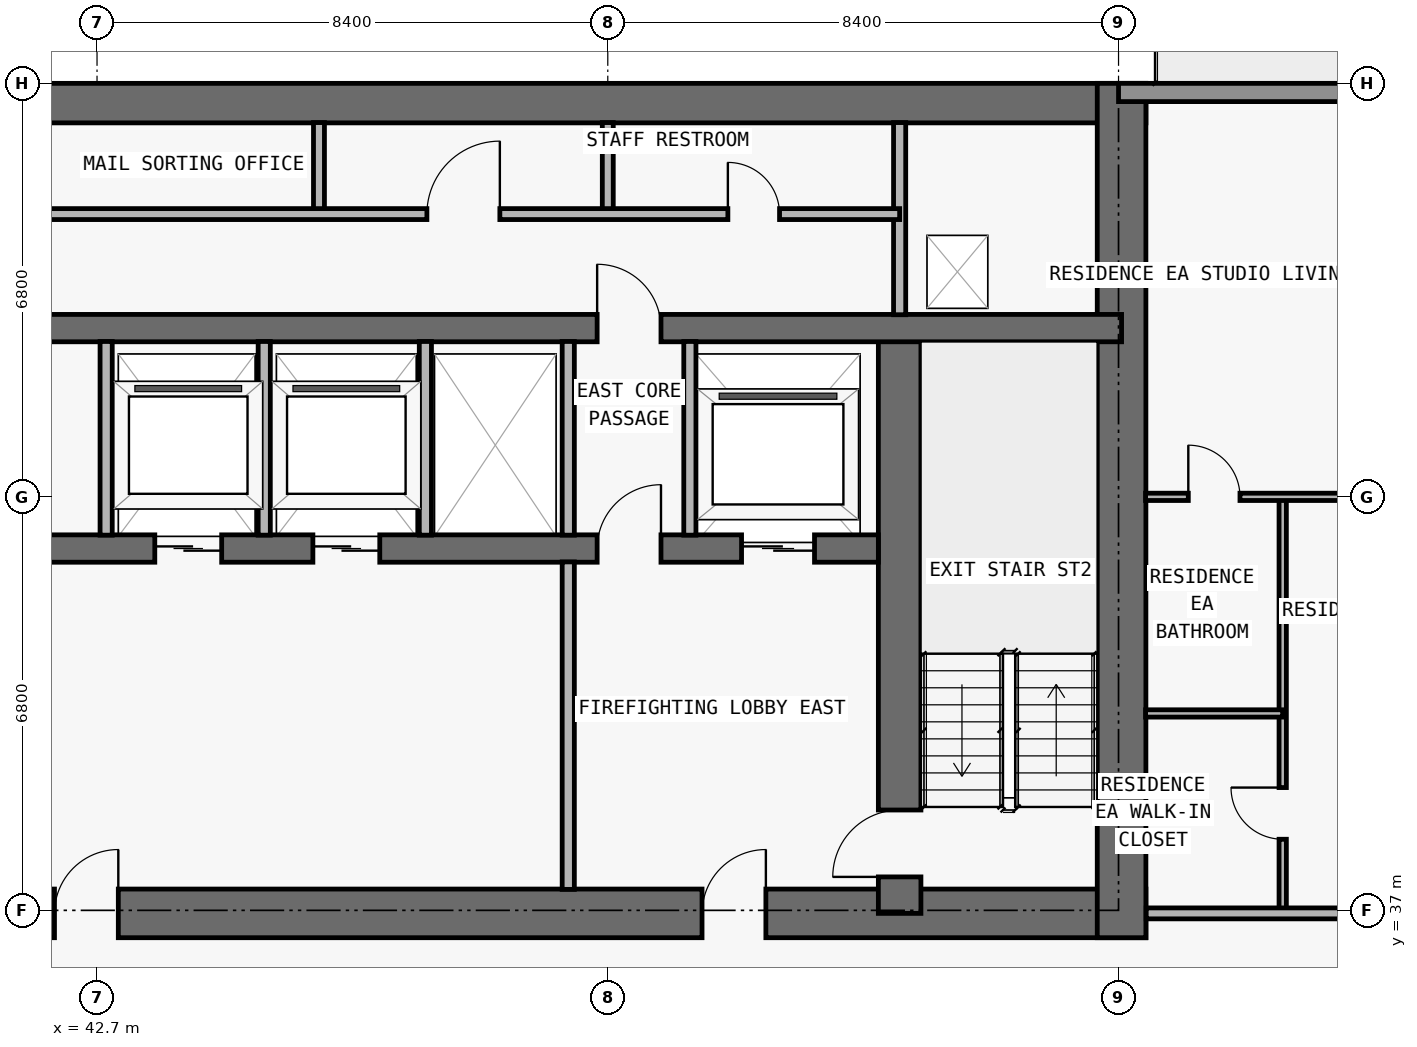
"""IFC4 building model, lengths in metres.
Left out: names, types, materials, properties, quantities, classifications, styles, units other than length and angle.
Written with IfcOpenShell. Run it as: python <this file> out.ifc"""

import sys

from ifc_helpers import new_model, si_unit, direction, frame, frame_2d, origin, place, context, subcontext, project, spatial, rectangle, extrude, element, fill, save


model = new_model("IFC4")
c1 = context("Model", 3, precision=1e-05, world=origin(), true_north=direction((0.0, 1.0)))
c2 = subcontext(c1, "Body", "Model", "MODEL_VIEW")
j1 = project(units=[si_unit("LENGTHUNIT", "METRE"), si_unit("PLANEANGLEUNIT", "RADIAN")], contexts=[c1])
p1 = place(None, origin())
s1 = spatial("IfcSite", under=j1, at=p1, CompositionType="ELEMENT")
p2 = place(p1, origin())
s2 = spatial("IfcBuilding", under=s1, at=p2, CompositionType="ELEMENT")
p3 = place(p2, frame((0.0, 0.0, 129.0)))
s3 = spatial("IfcBuildingStorey", under=s2, at=p3, CompositionType="ELEMENT", Elevation=129.0)
p4 = place(p3, frame((17.85, 36.95, 0.0), z_axis=(0.0, 0.0, 1.0), x_axis=(1.0, 0.0, 0.0)))
e1 = element("IfcWall", 1, at=p4, inside=s3, PredefinedType="SHEAR", context=c2, shape_type="SweptSolid", body=[
    extrude(rectangle(XDim=42.1, YDim=0.8, at=frame_2d((21.05, 0.0))), origin(), (0.0, 0.0, 1.0), 3.05),
])
p5 = place(p4, frame((14.45, 0.0, 0.0)))
e2 = element("IfcOpeningElement", 2, at=p5, cuts=e1, PredefinedType="OPENING", context=c2, shape_type="SweptSolid", body=[
    extrude(rectangle(XDim=1.1, YDim=2.15, at=frame_2d((0.55, 1.075))), frame((0.0, 0.41, 0.0), z_axis=(0.0, -1.0, 0.0), x_axis=(1.0, 0.0, 0.0)), (0.0, 0.0, 1.0), 0.82),
])
p6 = place(p4, frame((6.3, 0.0, 0.0)))
e3 = element("IfcOpeningElement", 3, at=p6, cuts=e1, PredefinedType="OPENING", context=c2, shape_type="SweptSolid", body=[
    extrude(rectangle(XDim=1.05, YDim=2.15, at=frame_2d((0.525, 1.075))), frame((0.0, 0.41, 0.0), z_axis=(0.0, -1.0, 0.0), x_axis=(1.0, 0.0, 0.0)), (0.0, 0.0, 1.0), 0.82),
])
p7 = place(p4, frame((34.8, 0.0, 0.0)))
e4 = element("IfcOpeningElement", 4, at=p7, cuts=e1, PredefinedType="OPENING", context=c2, shape_type="SweptSolid", body=[
    extrude(rectangle(XDim=1.05, YDim=2.15, at=frame_2d((0.525, 1.075))), frame((0.0, 0.41, 0.0), z_axis=(0.0, -1.0, 0.0), x_axis=(1.0, 0.0, 0.0)), (0.0, 0.0, 1.0), 0.82),
])
p8 = place(p4, frame((10.913, 0.0, 0.0)))
e5 = element("IfcOpeningElement", 5, at=p8, cuts=e1, PredefinedType="OPENING", context=c2, shape_type="SweptSolid", body=[
    extrude(rectangle(XDim=1.05, YDim=2.15, at=frame_2d((0.525, 1.075))), frame((0.0, 0.41, 0.0), z_axis=(0.0, -1.0, 0.0), x_axis=(1.0, 0.0, 0.0)), (0.0, 0.0, 1.0), 0.82),
])
p9 = place(p4, frame((24.15, 0.0, 0.0)))
e6 = element("IfcOpeningElement", 6, at=p9, cuts=e1, PredefinedType="OPENING", context=c2, shape_type="SweptSolid", body=[
    extrude(rectangle(XDim=1.05, YDim=2.15, at=frame_2d((0.525, 1.075))), frame((0.0, 0.41, 0.0), z_axis=(0.0, -1.0, 0.0), x_axis=(1.0, 0.0, 0.0)), (0.0, 0.0, 1.0), 0.82),
])
p10 = place(p3, frame((17.85, 50.275, 0.0), z_axis=(0.0, 0.0, 1.0), x_axis=(1.0, 0.0, 0.0)))
e7 = element("IfcWall", 7, at=p10, inside=s3, PredefinedType="SHEAR", context=c2, shape_type="SweptSolid", body=[
    extrude(rectangle(XDim=42.1, YDim=0.65, at=frame_2d((21.05, 0.0))), origin(), (0.0, 0.0, 1.0), 3.05),
])
p11 = place(p3, frame((59.55, 36.55, 0.0), z_axis=(0.0, 0.0, 1.0), x_axis=(0.0, 1.0, 0.0)))
e8 = element("IfcWall", 8, at=p11, inside=s3, PredefinedType="SHEAR", context=c2, shape_type="SweptSolid", body=[
    extrude(rectangle(XDim=14.05, YDim=0.8, at=frame_2d((7.025, 0.0))), origin(), (0.0, 0.0, 1.0), 3.05),
])
p12 = place(p3, frame((55.9, 36.95, 0.0), z_axis=(0.0, 0.0, 1.0), x_axis=(0.0, 1.0, 0.0)))
e9 = element("IfcWall", 9, at=p12, inside=s3, PredefinedType="SHEAR", context=c2, shape_type="SweptSolid", body=[
    extrude(rectangle(XDim=9.625, YDim=0.7, at=frame_2d((4.812, 0.0))), origin(), (0.0, 0.0, 1.0), 3.05),
])
p13 = place(p12, frame((0.6, 0.0, 0.0)))
e10 = element("IfcOpeningElement", 10, at=p13, cuts=e9, PredefinedType="OPENING", context=c2, shape_type="SweptSolid", body=[
    extrude(rectangle(XDim=1.1, YDim=2.15, at=frame_2d((0.55, 1.075))), frame((0.0, 0.36, 0.0), z_axis=(0.0, -1.0, 0.0), x_axis=(1.0, 0.0, 0.0)), (0.0, 0.0, 1.0), 0.72),
])
p14 = place(p3, frame((22.25, 42.95, 0.0), z_axis=(0.0, 0.0, 1.0), x_axis=(1.0, 0.0, 0.0)))
e11 = element("IfcWall", 11, at=p14, inside=s3, PredefinedType="SHEAR", context=c2, shape_type="SweptSolid", body=[
    extrude(rectangle(XDim=33.3, YDim=0.45, at=frame_2d((16.65, 0.0))), origin(), (0.0, 0.0, 1.0), 3.05),
])
p15 = place(p14, frame((1.05, 0.0, 0.0)))
e12 = element("IfcOpeningElement", 12, at=p15, cuts=e11, PredefinedType="OPENING", context=c2, shape_type="SweptSolid", body=[
    extrude(rectangle(XDim=1.2, YDim=2.2, at=frame_2d((0.6, 1.1))), frame((0.0, 0.235, 0.0), z_axis=(0.0, -1.0, 0.0), x_axis=(1.0, 0.0, 0.0)), (0.0, 0.0, 1.0), 0.47),
])
p16 = place(p14, frame((31.05, 0.0, 0.0)))
e13 = element("IfcOpeningElement", 13, at=p16, cuts=e11, PredefinedType="OPENING", context=c2, shape_type="SweptSolid", body=[
    extrude(rectangle(XDim=1.2, YDim=2.2, at=frame_2d((0.6, 1.1))), frame((0.0, 0.235, 0.0), z_axis=(0.0, -1.0, 0.0), x_axis=(1.0, 0.0, 0.0)), (0.0, 0.0, 1.0), 0.47),
])
p17 = place(p14, frame((21.4, 0.0, 0.0)))
e14 = element("IfcOpeningElement", 14, at=p17, cuts=e11, PredefinedType="OPENING", context=c2, shape_type="SweptSolid", body=[
    extrude(rectangle(XDim=1.1, YDim=2.2, at=frame_2d((0.55, 1.1))), frame((0.0, 0.235, 0.0), z_axis=(0.0, -1.0, 0.0), x_axis=(1.0, 0.0, 0.0)), (0.0, 0.0, 1.0), 0.47),
])
p18 = place(p14, frame((24.0, 0.0, 0.0)))
e15 = element("IfcOpeningElement", 15, at=p18, cuts=e11, PredefinedType="OPENING", context=c2, shape_type="SweptSolid", body=[
    extrude(rectangle(XDim=1.1, YDim=2.2, at=frame_2d((0.55, 1.1))), frame((0.0, 0.235, 0.0), z_axis=(0.0, -1.0, 0.0), x_axis=(1.0, 0.0, 0.0)), (0.0, 0.0, 1.0), 0.47),
])
p19 = place(p14, frame((3.625, 0.0, 0.0)))
e16 = element("IfcOpeningElement", 16, at=p19, cuts=e11, PredefinedType="OPENING", context=c2, shape_type="SweptSolid", body=[
    extrude(rectangle(XDim=1.05, YDim=2.15, at=frame_2d((0.525, 1.075))), frame((0.0, 0.235, 0.0), z_axis=(0.0, -1.0, 0.0), x_axis=(1.0, 0.0, 0.0)), (0.0, 0.0, 1.0), 0.47),
])
p20 = place(p14, frame((28.675, 0.0, 0.0)))
e17 = element("IfcOpeningElement", 17, at=p20, cuts=e11, PredefinedType="OPENING", context=c2, shape_type="SweptSolid", body=[
    extrude(rectangle(XDim=1.05, YDim=2.15, at=frame_2d((0.525, 1.075))), frame((0.0, 0.235, 0.0), z_axis=(0.0, -1.0, 0.0), x_axis=(1.0, 0.0, 0.0)), (0.0, 0.0, 1.0), 0.47),
])
p21 = place(p14, frame((15.975, 0.0, 0.0)))
e18 = element("IfcOpeningElement", 18, at=p21, cuts=e11, PredefinedType="OPENING", context=c2, shape_type="SweptSolid", body=[
    extrude(rectangle(XDim=1.0, YDim=2.2, at=frame_2d((0.5, 1.1))), frame((0.0, 0.235, 0.0), z_axis=(0.0, -1.0, 0.0), x_axis=(1.0, 0.0, 0.0)), (0.0, 0.0, 1.0), 0.47),
])
p22 = place(p3, frame((18.25, 46.575, 0.0), z_axis=(0.0, 0.0, 1.0), x_axis=(1.0, 0.0, 0.0)))
e19 = element("IfcWall", 19, at=p22, inside=s3, PredefinedType="SHEAR", context=c2, shape_type="SweptSolid", body=[
    extrude(rectangle(XDim=41.3, YDim=0.45, at=frame_2d((20.65, 0.0))), origin(), (0.0, 0.0, 1.0), 3.05),
])
p23 = place(p22, frame((7.625, 0.0, 0.0)))
e20 = element("IfcOpeningElement", 20, at=p23, cuts=e19, PredefinedType="OPENING", context=c2, shape_type="SweptSolid", body=[
    extrude(rectangle(XDim=1.05, YDim=2.15, at=frame_2d((0.525, 1.075))), frame((0.0, 0.235, 0.0), z_axis=(0.0, -1.0, 0.0), x_axis=(1.0, 0.0, 0.0)), (0.0, 0.0, 1.0), 0.47),
])
p24 = place(p22, frame((32.675, 0.0, 0.0)))
e21 = element("IfcOpeningElement", 21, at=p24, cuts=e19, PredefinedType="OPENING", context=c2, shape_type="SweptSolid", body=[
    extrude(rectangle(XDim=1.05, YDim=2.15, at=frame_2d((0.525, 1.075))), frame((0.0, 0.235, 0.0), z_axis=(0.0, -1.0, 0.0), x_axis=(1.0, 0.0, 0.0)), (0.0, 0.0, 1.0), 0.47),
])
p25 = place(p3, frame((59.5, 50.45, 0.0), z_axis=(0.0, 0.0, 1.0), x_axis=(1.0, 0.0, 0.0)))
e22 = element("IfcWall", 22, at=p25, inside=s3, PredefinedType="STANDARD", context=c2, shape_type="SweptSolid", body=[
    extrude(rectangle(XDim=10.6, YDim=0.3, at=frame_2d((5.3, 0.0))), origin(), (0.0, 0.0, 1.0), 3.05),
])
p26 = place(p25, frame((4.3, 0.0, 0.0)))
e23 = element("IfcOpeningElement", 23, at=p26, cuts=e22, PredefinedType="OPENING", context=c2, shape_type="SweptSolid", body=[
    extrude(rectangle(XDim=2.0, YDim=2.3, at=frame_2d((1.0, 1.15))), frame((0.0, 0.16, 0.0), z_axis=(0.0, -1.0, 0.0), x_axis=(1.0, 0.0, 0.0)), (0.0, 0.0, 1.0), 0.32),
])
for number, where, z_axis, x_axis in (
    (24, (42.85, 43.17, 0.0), (0.0, 0.0, 1.0), (0.0, 1.0, 0.0)),
    (25, (45.45, 43.17, 0.0), (0.0, 0.0, 1.0), (0.0, 1.0, 0.0)),
):
    element("IfcWall", number, at=place(p3, frame(where, z_axis=z_axis, x_axis=x_axis)), inside=s3, PredefinedType="PARTITIONING", context=c2, shape_type="SweptSolid", body=[
        extrude(rectangle(XDim=3.185, YDim=0.2, at=frame_2d((1.593, 0.0))), origin(), (0.0, 0.0, 1.0), 3.05),
    ])
p27 = place(p3, frame((46.35, 48.45, 0.0), z_axis=(0.0, 0.0, 1.0), x_axis=(0.0, 1.0, 0.0)))
e26 = element("IfcWall", 26, at=p27, inside=s3, PredefinedType="PARTITIONING", context=c2, shape_type="SweptSolid", body=[
    extrude(rectangle(XDim=1.505, YDim=0.18, at=frame_2d((0.752, 0.0))), origin(), (0.0, 0.0, 1.0), 3.05),
])
p28 = place(p3, frame((48.1, 43.17, 0.0), z_axis=(0.0, 0.0, 1.0), x_axis=(0.0, 1.0, 0.0)))
e27 = element("IfcWall", 27, at=p28, inside=s3, PredefinedType="PARTITIONING", context=c2, shape_type="SweptSolid", body=[
    extrude(rectangle(XDim=3.185, YDim=0.2, at=frame_2d((1.593, 0.0))), origin(), (0.0, 0.0, 1.0), 3.05),
])
p29 = place(p3, frame((50.45, 37.345, 0.0), z_axis=(0.0, 0.0, 1.0), x_axis=(0.0, 1.0, 0.0)))
e28 = element("IfcWall", 28, at=p29, inside=s3, PredefinedType="PARTITIONING", context=c2, shape_type="SweptSolid", body=[
    extrude(rectangle(XDim=5.385, YDim=0.2, at=frame_2d((2.692, 0.0))), origin(), (0.0, 0.0, 1.0), 3.05),
])
p30 = place(p3, frame((50.45, 43.17, 0.0), z_axis=(0.0, 0.0, 1.0), x_axis=(0.0, 1.0, 0.0)))
e29 = element("IfcWall", 29, at=p30, inside=s3, PredefinedType="PARTITIONING", context=c2, shape_type="SweptSolid", body=[
    extrude(rectangle(XDim=3.185, YDim=0.2, at=frame_2d((1.593, 0.0))), origin(), (0.0, 0.0, 1.0), 3.05),
])
p31 = place(p3, frame((51.1, 48.45, 0.0), z_axis=(0.0, 0.0, 1.0), x_axis=(0.0, 1.0, 0.0)))
e30 = element("IfcWall", 30, at=p31, inside=s3, PredefinedType="PARTITIONING", context=c2, shape_type="SweptSolid", body=[
    extrude(rectangle(XDim=1.505, YDim=0.18, at=frame_2d((0.752, 0.0))), origin(), (0.0, 0.0, 1.0), 3.05),
])
p32 = place(p3, frame((52.45, 43.17, 0.0), z_axis=(0.0, 0.0, 1.0), x_axis=(0.0, 1.0, 0.0)))
e31 = element("IfcWall", 31, at=p32, inside=s3, PredefinedType="PARTITIONING", context=c2, shape_type="SweptSolid", body=[
    extrude(rectangle(XDim=3.185, YDim=0.2, at=frame_2d((1.593, 0.0))), origin(), (0.0, 0.0, 1.0), 3.05),
])
p33 = place(p3, frame((55.9, 46.795, 0.0), z_axis=(0.0, 0.0, 1.0), x_axis=(0.0, 1.0, 0.0)))
e32 = element("IfcWall", 32, at=p33, inside=s3, PredefinedType="PARTITIONING", context=c2, shape_type="SweptSolid", body=[
    extrude(rectangle(XDim=3.16, YDim=0.2, at=frame_2d((1.58, 0.0))), origin(), (0.0, 0.0, 1.0), 3.05),
])
p34 = place(p3, frame((62.2, 36.95, 0.0), z_axis=(0.0, 0.0, 1.0), x_axis=(0.0, 1.0, 0.0)))
e33 = element("IfcWall", 33, at=p34, inside=s3, PredefinedType="PARTITIONING", context=c2, shape_type="SweptSolid", body=[
    extrude(rectangle(XDim=6.85, YDim=0.12, at=frame_2d((3.425, 0.0))), origin(), (0.0, 0.0, 1.0), 3.05),
])
p35 = place(p34, frame((1.219, 0.0, 0.0)))
e34 = element("IfcOpeningElement", 34, at=p35, cuts=e33, PredefinedType="OPENING", context=c2, shape_type="SweptSolid", body=[
    extrude(rectangle(XDim=0.85, YDim=2.1, at=frame_2d((0.425, 1.05))), frame((0.0, 0.07, 0.0), z_axis=(0.0, -1.0, 0.0), x_axis=(1.0, 0.0, 0.0)), (0.0, 0.0, 1.0), 0.14),
])
p36 = place(p3, frame((59.955, 36.95, 0.0), z_axis=(0.0, 0.0, 1.0), x_axis=(1.0, 0.0, 0.0)))
e35 = element("IfcWall", 35, at=p36, inside=s3, PredefinedType="PARTITIONING", context=c2, shape_type="SweptSolid", body=[
    extrude(rectangle(XDim=10.145, YDim=0.18, at=frame_2d((5.073, 0.0))), origin(), (0.0, 0.0, 1.0), 3.05),
])
p37 = place(p36, frame((3.957, 0.0, 0.0)))
e36 = element("IfcOpeningElement", 36, at=p37, cuts=e35, PredefinedType="OPENING", context=c2, shape_type="SweptSolid", body=[
    extrude(rectangle(XDim=1.0, YDim=2.2, at=frame_2d((0.5, 1.1))), frame((0.0, 0.1, 0.0), z_axis=(0.0, -1.0, 0.0), x_axis=(1.0, 0.0, 0.0)), (0.0, 0.0, 1.0), 0.2),
])
p38 = place(p3, frame((59.945, 40.238, 0.0), z_axis=(0.0, 0.0, 1.0), x_axis=(1.0, 0.0, 0.0)))
e37 = element("IfcWall", 37, at=p38, inside=s3, PredefinedType="PARTITIONING", context=c2, shape_type="SweptSolid", body=[
    extrude(rectangle(XDim=2.255, YDim=0.12, at=frame_2d((1.127, 0.0))), origin(), (0.0, 0.0, 1.0), 3.05),
])
p39 = place(p3, frame((59.945, 43.8, 0.0), z_axis=(0.0, 0.0, 1.0), x_axis=(1.0, 0.0, 0.0)))
e38 = element("IfcWall", 38, at=p39, inside=s3, PredefinedType="PARTITIONING", context=c2, shape_type="SweptSolid", body=[
    extrude(rectangle(XDim=13.66, YDim=0.12, at=frame_2d((6.83, 0.0))), origin(), (0.0, 0.0, 1.0), 2.339),
])
p40 = place(p39, frame((4.017, 0.0, 0.0)))
e39 = element("IfcOpeningElement", 39, at=p40, cuts=e38, PredefinedType="OPENING", context=c2, shape_type="SweptSolid", body=[
    extrude(rectangle(XDim=0.9, YDim=2.15, at=frame_2d((0.45, 1.075))), frame((0.0, 0.07, 0.0), z_axis=(0.0, -1.0, 0.0), x_axis=(1.0, 0.0, 0.0)), (0.0, 0.0, 1.0), 0.14),
])
p41 = place(p39, frame((0.702, 0.0, 0.0)))
e40 = element("IfcOpeningElement", 40, at=p41, cuts=e38, PredefinedType="OPENING", context=c2, shape_type="SweptSolid", body=[
    extrude(rectangle(XDim=0.85, YDim=2.1, at=frame_2d((0.425, 1.05))), frame((0.0, 0.07, 0.0), z_axis=(0.0, -1.0, 0.0), x_axis=(1.0, 0.0, 0.0)), (0.0, 0.0, 1.0), 0.14),
])
p42 = place(p3, frame((26.7, 48.45, 0.0), z_axis=(0.0, 0.0, 1.0), x_axis=(1.0, 0.0, 0.0)))
e41 = element("IfcWall", 41, at=p42, inside=s3, PredefinedType="PARTITIONING", context=c2, shape_type="SweptSolid", body=[
    extrude(rectangle(XDim=29.2, YDim=0.18, at=frame_2d((14.6, 0.0))), origin(), (0.0, 0.0, 1.0), 3.05),
])
p43 = place(p42, frame((1.75, 0.0, 0.0)))
e42 = element("IfcOpeningElement", 42, at=p43, cuts=e41, PredefinedType="OPENING", context=c2, shape_type="SweptSolid", body=[
    extrude(rectangle(XDim=1.2, YDim=2.2, at=frame_2d((0.6, 1.1))), frame((0.0, 0.1, 0.0), z_axis=(0.0, -1.0, 0.0), x_axis=(1.0, 0.0, 0.0)), (0.0, 0.0, 1.0), 0.2),
])
p44 = place(p42, frame((6.475, 0.0, 0.0)))
e43 = element("IfcOpeningElement", 43, at=p44, cuts=e41, PredefinedType="OPENING", context=c2, shape_type="SweptSolid", body=[
    extrude(rectangle(XDim=1.2, YDim=2.2, at=frame_2d((0.6, 1.1))), frame((0.0, 0.1, 0.0), z_axis=(0.0, -1.0, 0.0), x_axis=(1.0, 0.0, 0.0)), (0.0, 0.0, 1.0), 0.2),
])
p45 = place(p42, frame((14.05, 0.0, 0.0)))
e44 = element("IfcOpeningElement", 44, at=p45, cuts=e41, PredefinedType="OPENING", context=c2, shape_type="SweptSolid", body=[
    extrude(rectangle(XDim=1.0, YDim=2.2, at=frame_2d((0.5, 1.1))), frame((0.0, 0.1, 0.0), z_axis=(0.0, -1.0, 0.0), x_axis=(1.0, 0.0, 0.0)), (0.0, 0.0, 1.0), 0.2),
])
p46 = place(p42, frame((21.425, 0.0, 0.0)))
e45 = element("IfcOpeningElement", 45, at=p46, cuts=e41, PredefinedType="OPENING", context=c2, shape_type="SweptSolid", body=[
    extrude(rectangle(XDim=1.2, YDim=2.2, at=frame_2d((0.6, 1.1))), frame((0.0, 0.1, 0.0), z_axis=(0.0, -1.0, 0.0), x_axis=(1.0, 0.0, 0.0)), (0.0, 0.0, 1.0), 0.2),
])
p47 = place(p42, frame((26.375, 0.0, 0.0)))
e46 = element("IfcOpeningElement", 46, at=p47, cuts=e41, PredefinedType="OPENING", context=c2, shape_type="SweptSolid", body=[
    extrude(rectangle(XDim=0.85, YDim=2.1, at=frame_2d((0.425, 1.05))), frame((0.0, 0.1, 0.0), z_axis=(0.0, -1.0, 0.0), x_axis=(1.0, 0.0, 0.0)), (0.0, 0.0, 1.0), 0.2),
])
p48 = place(p16, origin())
e47 = element("IfcDoor", 47, at=p48, inside=s3, OperationType="DOUBLE_DOOR_SLIDING", PredefinedType="DOOR", context=c2, shape_type="SweptSolid", body=[
    extrude(rectangle(XDim=1.2, YDim=2.2, at=frame_2d((0.6, 1.1))), frame((0.0, 0.025, 0.0), z_axis=(0.0, -1.0, 0.0), x_axis=(1.0, 0.0, 0.0)), (0.0, 0.0, 1.0), 0.05),
])
fill(e13, e47)
p49 = place(p17, origin())
e48 = element("IfcDoor", 48, at=p49, inside=s3, OperationType="DOUBLE_DOOR_SLIDING", PredefinedType="DOOR", context=c2, shape_type="SweptSolid", body=[
    extrude(rectangle(XDim=1.1, YDim=2.2, at=frame_2d((0.55, 1.1))), frame((0.0, 0.025, 0.0), z_axis=(0.0, -1.0, 0.0), x_axis=(1.0, 0.0, 0.0)), (0.0, 0.0, 1.0), 0.05),
])
fill(e14, e48)
p50 = place(p18, origin())
e49 = element("IfcDoor", 49, at=p50, inside=s3, OperationType="DOUBLE_DOOR_SLIDING", PredefinedType="DOOR", context=c2, shape_type="SweptSolid", body=[
    extrude(rectangle(XDim=1.1, YDim=2.2, at=frame_2d((0.55, 1.1))), frame((0.0, 0.025, 0.0), z_axis=(0.0, -1.0, 0.0), x_axis=(1.0, 0.0, 0.0)), (0.0, 0.0, 1.0), 0.05),
])
fill(e15, e49)
p51 = place(p7, origin())
e50 = element("IfcDoor", 50, at=p51, inside=s3, OperationType="SINGLE_SWING_RIGHT", PredefinedType="DOOR", context=c2, shape_type="SweptSolid", body=[
    extrude(rectangle(XDim=1.05, YDim=2.15, at=frame_2d((0.525, 1.075))), frame((0.0, 0.025, 0.0), z_axis=(0.0, -1.0, 0.0), x_axis=(1.0, 0.0, 0.0)), (0.0, 0.0, 1.0), 0.05),
])
fill(e4, e50)
p52 = place(p13, origin())
e51 = element("IfcDoor", 51, at=p52, inside=s3, OperationType="SINGLE_SWING_LEFT", PredefinedType="DOOR", context=c2, shape_type="SweptSolid", body=[
    extrude(rectangle(XDim=1.1, YDim=2.15, at=frame_2d((0.55, 1.075))), frame((0.0, 0.025, 0.0), z_axis=(0.0, -1.0, 0.0), x_axis=(1.0, 0.0, 0.0)), (0.0, 0.0, 1.0), 0.05),
])
fill(e10, e51)
p53 = place(p20, origin())
e52 = element("IfcDoor", 52, at=p53, inside=s3, OperationType="SINGLE_SWING_RIGHT", PredefinedType="DOOR", context=c2, shape_type="SweptSolid", body=[
    extrude(rectangle(XDim=1.05, YDim=2.15, at=frame_2d((0.525, 1.075))), frame((0.0, 0.025, 0.0), z_axis=(0.0, -1.0, 0.0), x_axis=(1.0, 0.0, 0.0)), (0.0, 0.0, 1.0), 0.05),
])
fill(e17, e52)
p54 = place(p9, origin())
e53 = element("IfcDoor", 53, at=p54, inside=s3, OperationType="SINGLE_SWING_RIGHT", PredefinedType="DOOR", context=c2, shape_type="SweptSolid", body=[
    extrude(rectangle(XDim=1.05, YDim=2.15, at=frame_2d((0.525, 1.075))), frame((0.0, 0.025, 0.0), z_axis=(0.0, -1.0, 0.0), x_axis=(1.0, 0.0, 0.0)), (0.0, 0.0, 1.0), 0.05),
])
fill(e6, e53)
p55 = place(p24, origin())
e54 = element("IfcDoor", 54, at=p55, inside=s3, OperationType="SINGLE_SWING_LEFT", PredefinedType="DOOR", context=c2, shape_type="SweptSolid", body=[
    extrude(rectangle(XDim=1.05, YDim=2.15, at=frame_2d((0.525, 1.075))), frame((0.0, 0.025, 0.0), z_axis=(0.0, -1.0, 0.0), x_axis=(1.0, 0.0, 0.0)), (0.0, 0.0, 1.0), 0.05),
])
fill(e21, e54)
p56 = place(p46, origin())
e55 = element("IfcDoor", 55, at=p56, inside=s3, OperationType="SINGLE_SWING_RIGHT", PredefinedType="DOOR", context=c2, shape_type="SweptSolid", body=[
    extrude(rectangle(XDim=1.2, YDim=2.2, at=frame_2d((0.6, 1.1))), frame((0.0, 0.025, 0.0), z_axis=(0.0, -1.0, 0.0), x_axis=(1.0, 0.0, 0.0)), (0.0, 0.0, 1.0), 0.05),
])
fill(e45, e55)
p57 = place(p47, origin())
e56 = element("IfcDoor", 56, at=p57, inside=s3, OperationType="SINGLE_SWING_LEFT", PredefinedType="DOOR", context=c2, shape_type="SweptSolid", body=[
    extrude(rectangle(XDim=0.85, YDim=2.1, at=frame_2d((0.425, 1.05))), frame((0.0, 0.025, 0.0), z_axis=(0.0, -1.0, 0.0), x_axis=(1.0, 0.0, 0.0)), (0.0, 0.0, 1.0), 0.05),
])
fill(e46, e56)
p58 = place(p35, origin())
e57 = element("IfcDoor", 57, at=p58, inside=s3, OperationType="SINGLE_SWING_RIGHT", PredefinedType="DOOR", context=c2, shape_type="SweptSolid", body=[
    extrude(rectangle(XDim=0.85, YDim=2.1, at=frame_2d((0.425, 1.05))), frame((0.0, 0.025, 0.0), z_axis=(0.0, -1.0, 0.0), x_axis=(1.0, 0.0, 0.0)), (0.0, 0.0, 1.0), 0.05),
])
fill(e34, e57)
p59 = place(p41, origin())
e58 = element("IfcDoor", 58, at=p59, inside=s3, OperationType="SINGLE_SWING_LEFT", PredefinedType="DOOR", context=c2, shape_type="SweptSolid", body=[
    extrude(rectangle(XDim=0.85, YDim=2.1, at=frame_2d((0.425, 1.05))), frame((0.0, 0.025, 0.0), z_axis=(0.0, -1.0, 0.0), x_axis=(1.0, 0.0, 0.0)), (0.0, 0.0, 1.0), 0.05),
])
fill(e40, e58)
save(model, sys.argv[1])
